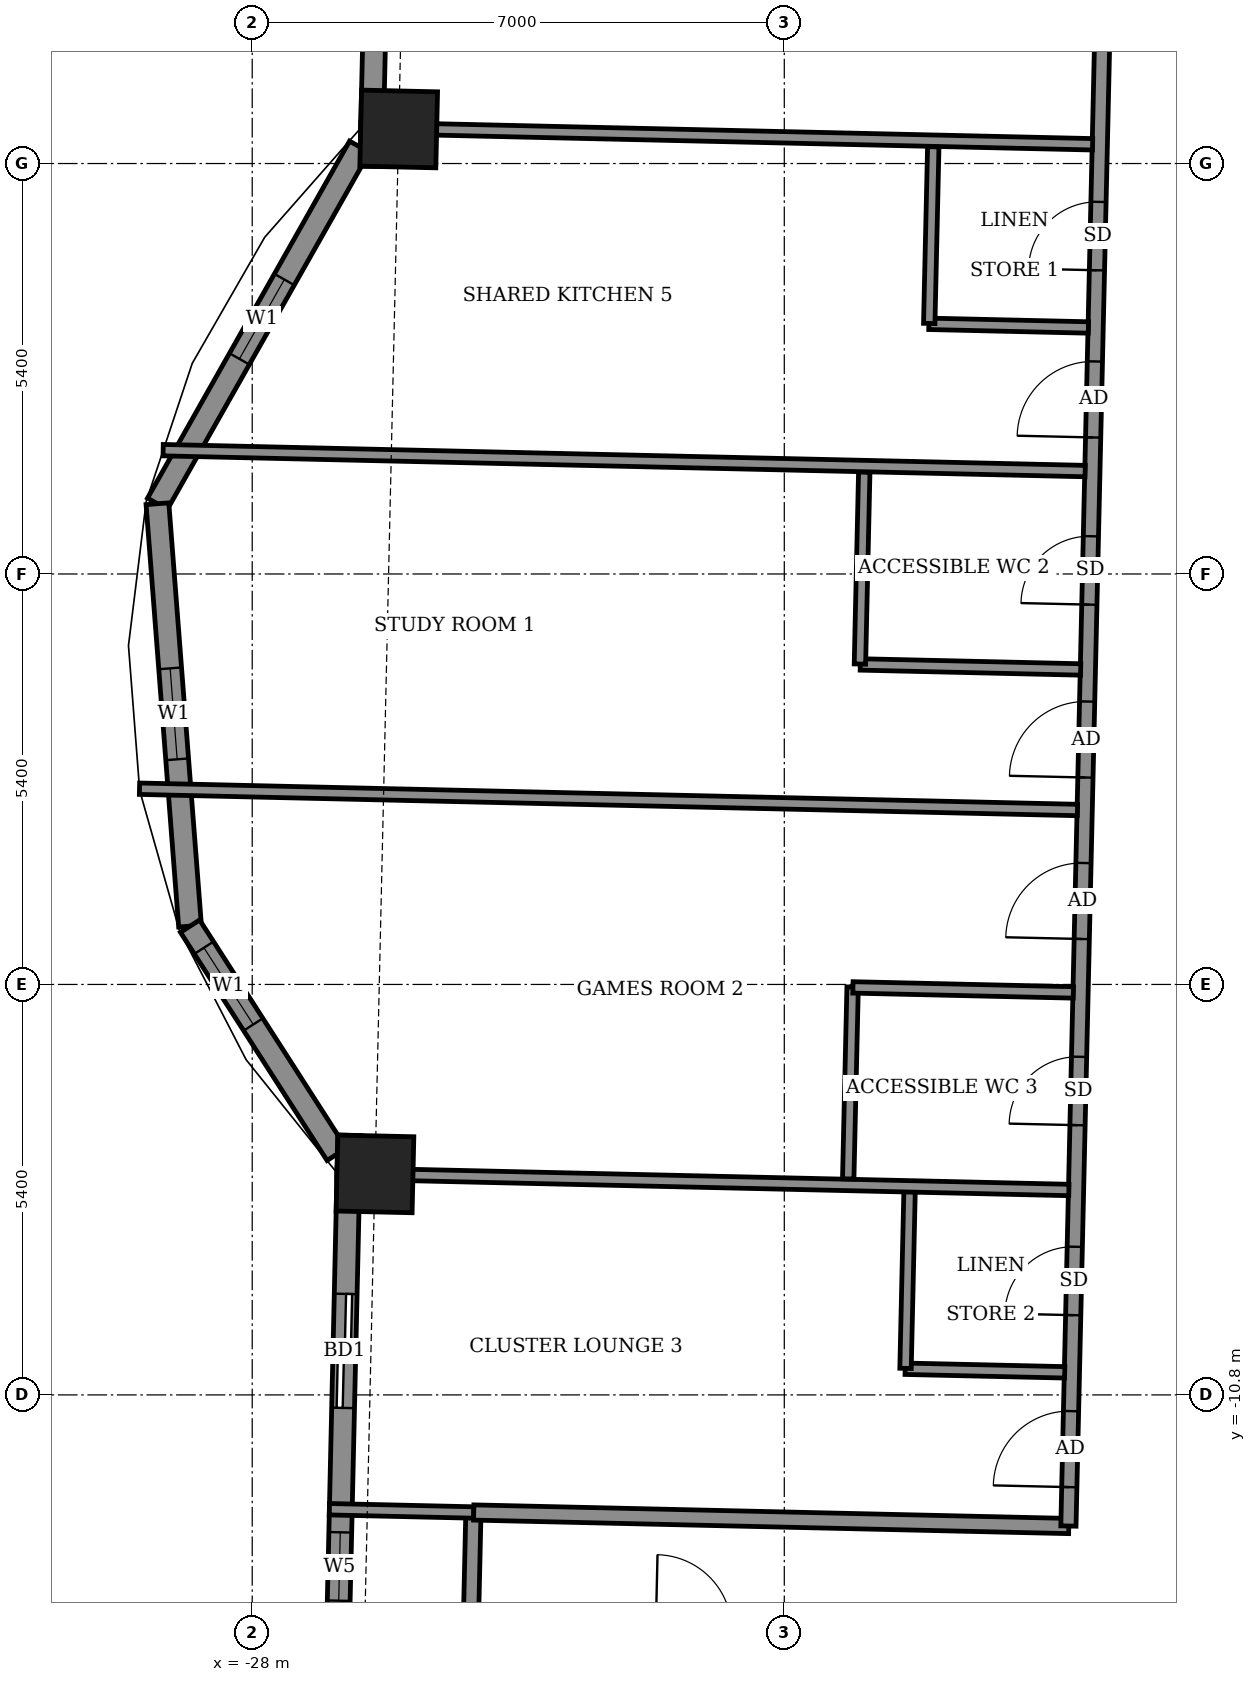
"""IFC4 building model, lengths in metres.
Left out: names, types, materials, properties, quantities, classifications, styles, units other than length and angle.
Written with IfcOpenShell. Run it as: python <this file> out.ifc"""

import sys

from ifc_helpers import new_model, si_unit, direction, frame, frame_2d, origin, origin_2d, place, context, subcontext, project, spatial, rectangle, extrude, element, fill, save


model = new_model("IFC4")
c1 = context("Model", 3, precision=1e-05, world=origin(), true_north=direction((0.0, 1.0)))
c2 = subcontext(c1, "Body", "Model", "MODEL_VIEW")
j1 = project(units=[si_unit("LENGTHUNIT", "METRE"), si_unit("PLANEANGLEUNIT", "RADIAN")], contexts=[c1])
p1 = place(None, origin())
s1 = spatial("IfcSite", under=j1, at=p1, CompositionType="ELEMENT")
p2 = place(p1, origin())
s2 = spatial("IfcBuilding", under=s1, at=p2, CompositionType="ELEMENT")
p3 = place(p2, frame((0.0, 0.0, 268.1)))
s3 = spatial("IfcBuildingStorey", under=s2, at=p3, CompositionType="ELEMENT", Elevation=268.1)
for number, where, z_axis, x_axis in (
    (1, (-26.385, -7.892, -0.55), (0.0, 0.0, 1.0), (-0.023, -1.0, 0.0)),
    (2, (-26.073, 5.855, -0.55), (0.0, 0.0, 1.0), (-0.023, -1.0, 0.0)),
):
    element("IfcColumn", number, at=place(p3, frame(where, z_axis=z_axis, x_axis=x_axis)), inside=s3, PredefinedType="COLUMN", context=c2, shape_type="SweptSolid", body=[
        extrude(rectangle(XDim=1.0, YDim=1.0, at=origin_2d()), origin(), (0.0, 0.0, 1.0), 3.6),
    ])
p4 = place(p3, frame((-26.113, 19.534, 0.0), z_axis=(0.0, 0.0, 1.0), x_axis=(-0.022649415303, -0.999743469089, 0.0)))
e3 = element("IfcWall", 3, at=p4, inside=s3, PredefinedType="SOLIDWALL", context=c2, shape_type="SweptSolid", body=[
    extrude(rectangle(XDim=14.175, YDim=0.3, at=frame_2d((7.087, 0.0))), origin(), (0.0, 0.0, 1.0), 2.55),
])
p5 = place(p4, frame((2.735, 0.0, 0.0)))
e4 = element("IfcOpeningElement", 4, at=p5, cuts=e3, PredefinedType="OPENING", context=c2, shape_type="SweptSolid", body=[
    extrude(rectangle(XDim=1.5, YDim=2.4, at=frame_2d((0.75, 1.2))), frame((0.0, 0.16, 0.0), z_axis=(0.0, -1.0, 0.0), x_axis=(1.0, 0.0, 0.0)), (0.0, 0.0, 1.0), 0.32),
])
p6 = place(p4, frame((9.019, 0.0, 0.9)))
e5 = element("IfcOpeningElement", 5, at=p6, cuts=e3, PredefinedType="OPENING", context=c2, shape_type="SweptSolid", body=[
    extrude(rectangle(XDim=2.4, YDim=1.5, at=frame_2d((1.2, 0.75))), frame((0.0, 0.16, 0.0), z_axis=(0.0, -1.0, 0.0), x_axis=(1.0, 0.0, 0.0)), (0.0, 0.0, 1.0), 0.32),
])
p7 = place(p3, frame((-26.589, 5.621, 0.0), z_axis=(0.0, 0.0, 1.0), x_axis=(-0.492495436053, -0.870315026566, 0.0)))
e6 = element("IfcWall", 6, at=p7, inside=s3, PredefinedType="SOLIDWALL", context=c2, shape_type="SweptSolid", body=[
    extrude(rectangle(XDim=5.397, YDim=0.3, at=frame_2d((2.698, 0.0))), origin(), (0.0, 0.0, 1.0), 3.05),
])
p8 = place(p7, frame((2.007, 0.0, 0.9)))
e7 = element("IfcOpeningElement", 7, at=p8, cuts=e6, PredefinedType="OPENING", context=c2, shape_type="SweptSolid", body=[
    extrude(rectangle(XDim=1.2, YDim=1.5, at=frame_2d((0.6, 0.75))), frame((0.0, 0.16, 0.0), z_axis=(0.0, -1.0, 0.0), x_axis=(1.0, 0.0, 0.0)), (0.0, 0.0, 1.0), 0.32),
])
p9 = place(p3, frame((-29.247, 0.924, 0.0), z_axis=(0.0, 0.0, 1.0), x_axis=(0.076961115238, -0.997034095075, 0.0)))
e8 = element("IfcWall", 8, at=p9, inside=s3, PredefinedType="SOLIDWALL", context=c2, shape_type="SweptSolid", body=[
    extrude(rectangle(XDim=5.574, YDim=0.3, at=frame_2d((2.787, 0.0))), origin(), (0.0, 0.0, 1.0), 3.05),
])
p10 = place(p9, frame((2.172, 0.0, 0.9)))
e9 = element("IfcOpeningElement", 9, at=p10, cuts=e8, PredefinedType="OPENING", context=c2, shape_type="SweptSolid", body=[
    extrude(rectangle(XDim=1.2, YDim=1.5, at=frame_2d((0.6, 0.75))), frame((0.0, 0.16, 0.0), z_axis=(0.0, -1.0, 0.0), x_axis=(1.0, 0.0, 0.0)), (0.0, 0.0, 1.0), 0.32),
])
p11 = place(p3, frame((-28.818, -4.633, 0.0), z_axis=(0.0, 0.0, 1.0), x_axis=(0.540633100578, -0.841258492117, 0.0)))
e10 = element("IfcWall", 10, at=p11, inside=s3, PredefinedType="SOLIDWALL", context=c2, shape_type="SweptSolid", body=[
    extrude(rectangle(XDim=3.568, YDim=0.3, at=frame_2d((1.784, 0.0))), origin(), (0.0, 0.0, 1.0), 3.05),
])
p12 = place(p11, frame((0.338, 0.0, 0.9)))
e11 = element("IfcOpeningElement", 11, at=p12, cuts=e10, PredefinedType="OPENING", context=c2, shape_type="SweptSolid", body=[
    extrude(rectangle(XDim=1.2, YDim=1.5, at=frame_2d((0.6, 0.75))), frame((0.0, 0.16, 0.0), z_axis=(0.0, -1.0, 0.0), x_axis=(1.0, 0.0, 0.0)), (0.0, 0.0, 1.0), 0.32),
])
p13 = place(p3, frame((-26.723, -7.385, 0.0), z_axis=(0.0, 0.0, 1.0), x_axis=(-0.022715697396, -0.999741965255, 0.0)))
e12 = element("IfcWall", 12, at=p13, inside=s3, PredefinedType="SOLIDWALL", context=c2, shape_type="SweptSolid", body=[
    extrude(rectangle(XDim=14.574, YDim=0.3, at=frame_2d((7.287, 0.0))), origin(), (0.0, 0.0, 1.0), 2.55),
])
p14 = place(p13, frame((2.087, 0.0, 0.0)))
e13 = element("IfcOpeningElement", 13, at=p14, cuts=e12, PredefinedType="OPENING", context=c2, shape_type="SweptSolid", body=[
    extrude(rectangle(XDim=1.5, YDim=2.4, at=frame_2d((0.75, 1.2))), frame((0.0, 0.16, 0.0), z_axis=(0.0, -1.0, 0.0), x_axis=(1.0, 0.0, 0.0)), (0.0, 0.0, 1.0), 0.32),
])
p15 = place(p13, frame((5.224, 0.0, 0.9)))
e14 = element("IfcOpeningElement", 14, at=p15, cuts=e12, PredefinedType="OPENING", context=c2, shape_type="SweptSolid", body=[
    extrude(rectangle(XDim=0.9, YDim=1.5, at=frame_2d((0.45, 0.75))), frame((0.0, 0.16, 0.0), z_axis=(0.0, -1.0, 0.0), x_axis=(1.0, 0.0, 0.0)), (0.0, 0.0, 1.0), 0.32),
])
p16 = place(p13, frame((9.749, 0.0, 0.9)))
e15 = element("IfcOpeningElement", 15, at=p16, cuts=e12, PredefinedType="OPENING", context=c2, shape_type="SweptSolid", body=[
    extrude(rectangle(XDim=2.4, YDim=1.5, at=frame_2d((1.2, 0.75))), frame((0.0, 0.16, 0.0), z_axis=(0.0, -1.0, 0.0), x_axis=(1.0, 0.0, 0.0)), (0.0, 0.0, 1.0), 0.32),
])
p17 = place(p3, frame((-29.57, -10.945, 0.0), z_axis=(0.0, 0.0, 1.0), x_axis=(0.022675106248, 0.999742886725, 0.0)))
e16 = element("IfcWall", 16, at=p17, inside=s3, PredefinedType="USERDEFINED", context=c2, shape_type="SweptSolid", body=[
    extrude(rectangle(XDim=2.875, YDim=0.55, at=frame_2d((1.438, 0.0))), origin(), (0.0, 0.0, 1.0), 0.8),
])
p18 = place(p3, frame((-25.124, -13.847, 0.0), z_axis=(0.0, 0.0, 1.0), x_axis=(0.022617910375, 0.999744182344, 0.0)))
e17 = element("IfcWall", 17, at=p18, inside=s3, PredefinedType="PARTITIONING", context=c2, shape_type="SweptSolid", body=[
    extrude(rectangle(XDim=1.5, YDim=0.2, at=frame_2d((0.75, 0.0))), origin(), (0.0, 0.0, 1.0), 3.05),
])
p19 = place(p3, frame((-26.985, -12.304, 0.0), z_axis=(0.0, 0.0, 1.0), x_axis=(0.999744152544, -0.022619227516, 0.0)))
e18 = element("IfcWall", 18, at=p19, inside=s3, PredefinedType="PARTITIONING", context=c2, shape_type="SweptSolid", body=[
    extrude(rectangle(XDim=1.9, YDim=0.15, at=frame_2d((0.95, 0.0))), origin(), (0.0, 0.0, 1.0), 2.5),
])
p20 = place(p3, frame((-25.086, -12.347, 0.0), z_axis=(0.0, 0.0, 1.0), x_axis=(0.999741690667, -0.022727779103, 0.0)))
e19 = element("IfcWall", 19, at=p20, inside=s3, PredefinedType="PARTITIONING", context=c2, shape_type="SweptSolid", body=[
    extrude(rectangle(XDim=7.831, YDim=0.2, at=frame_2d((3.916, 0.0))), origin(), (0.0, 0.0, 1.0), 3.05),
])
p21 = place(p3, frame((-17.262, -12.525, 0.0), z_axis=(0.0, 0.0, 1.0), x_axis=(0.022706151961, 0.999742182097, 0.0)))
e20 = element("IfcWall", 20, at=p21, inside=s3, PredefinedType="PARTITIONING", context=c2, shape_type="SweptSolid", body=[
    extrude(rectangle(XDim=25.45, YDim=0.2, at=frame_2d((12.725, 0.0))), origin(), (0.0, 0.0, 1.0), 3.05),
])
p22 = place(p21, frame((19.913, 0.0, 0.0)))
e21 = element("IfcOpeningElement", 21, at=p22, cuts=e20, PredefinedType="OPENING", context=c2, shape_type="SweptSolid", body=[
    extrude(rectangle(XDim=1.0, YDim=2.1, at=frame_2d((0.5, 1.05))), frame((0.0, 0.11, 0.0), z_axis=(0.0, -1.0, 0.0), x_axis=(1.0, 0.0, 0.0)), (0.0, 0.0, 1.0), 0.22),
])
p23 = place(p21, frame((23.6, 0.0, 0.0)))
e22 = element("IfcOpeningElement", 22, at=p23, cuts=e20, PredefinedType="OPENING", context=c2, shape_type="SweptSolid", body=[
    extrude(rectangle(XDim=0.9, YDim=2.1, at=frame_2d((0.45, 1.05))), frame((0.0, 0.11, 0.0), z_axis=(0.0, -1.0, 0.0), x_axis=(1.0, 0.0, 0.0)), (0.0, 0.0, 1.0), 0.22),
])
p24 = place(p21, frame((14.325, 0.0, 0.0)))
e23 = element("IfcOpeningElement", 23, at=p24, cuts=e20, PredefinedType="OPENING", context=c2, shape_type="SweptSolid", body=[
    extrude(rectangle(XDim=1.0, YDim=2.1, at=frame_2d((0.5, 1.05))), frame((0.0, 0.11, 0.0), z_axis=(0.0, -1.0, 0.0), x_axis=(1.0, 0.0, 0.0)), (0.0, 0.0, 1.0), 0.22),
])
p25 = place(p21, frame((16.525, 0.0, 0.0)))
e24 = element("IfcOpeningElement", 24, at=p25, cuts=e20, PredefinedType="OPENING", context=c2, shape_type="SweptSolid", body=[
    extrude(rectangle(XDim=0.9, YDim=2.1, at=frame_2d((0.45, 1.05))), frame((0.0, 0.11, 0.0), z_axis=(0.0, -1.0, 0.0), x_axis=(1.0, 0.0, 0.0)), (0.0, 0.0, 1.0), 0.22),
])
p26 = place(p21, frame((9.85, 0.0, 0.0)))
e25 = element("IfcOpeningElement", 25, at=p26, cuts=e20, PredefinedType="OPENING", context=c2, shape_type="SweptSolid", body=[
    extrude(rectangle(XDim=1.0, YDim=2.1, at=frame_2d((0.5, 1.05))), frame((0.0, 0.11, 0.0), z_axis=(0.0, -1.0, 0.0), x_axis=(1.0, 0.0, 0.0)), (0.0, 0.0, 1.0), 0.22),
])
p27 = place(p21, frame((12.125, 0.0, 0.0)))
e26 = element("IfcOpeningElement", 26, at=p27, cuts=e20, PredefinedType="OPENING", context=c2, shape_type="SweptSolid", body=[
    extrude(rectangle(XDim=0.9, YDim=2.1, at=frame_2d((0.45, 1.05))), frame((0.0, 0.11, 0.0), z_axis=(0.0, -1.0, 0.0), x_axis=(1.0, 0.0, 0.0)), (0.0, 0.0, 1.0), 0.22),
])
p28 = place(p21, frame((7.725, 0.0, 0.0)))
e27 = element("IfcOpeningElement", 27, at=p28, cuts=e20, PredefinedType="OPENING", context=c2, shape_type="SweptSolid", body=[
    extrude(rectangle(XDim=1.0, YDim=2.1, at=frame_2d((0.5, 1.05))), frame((0.0, 0.11, 0.0), z_axis=(0.0, -1.0, 0.0), x_axis=(1.0, 0.0, 0.0)), (0.0, 0.0, 1.0), 0.22),
])
p29 = place(p21, frame((5.275, 0.0, 0.0)))
e28 = element("IfcOpeningElement", 28, at=p29, cuts=e20, PredefinedType="OPENING", context=c2, shape_type="SweptSolid", body=[
    extrude(rectangle(XDim=0.9, YDim=2.1, at=frame_2d((0.45, 1.05))), frame((0.0, 0.11, 0.0), z_axis=(0.0, -1.0, 0.0), x_axis=(1.0, 0.0, 0.0)), (0.0, 0.0, 1.0), 0.22),
])
p30 = place(p21, frame((0.512, 0.0, 0.0)))
e29 = element("IfcOpeningElement", 29, at=p30, cuts=e20, PredefinedType="OPENING", context=c2, shape_type="SweptSolid", body=[
    extrude(rectangle(XDim=1.0, YDim=2.1, at=frame_2d((0.5, 1.05))), frame((0.0, 0.11, 0.0), z_axis=(0.0, -1.0, 0.0), x_axis=(1.0, 0.0, 0.0)), (0.0, 0.0, 1.0), 0.22),
])
p31 = place(p21, frame((2.775, 0.0, 0.0)))
e30 = element("IfcOpeningElement", 30, at=p31, cuts=e20, PredefinedType="OPENING", context=c2, shape_type="SweptSolid", body=[
    extrude(rectangle(XDim=0.9, YDim=2.1, at=frame_2d((0.45, 1.05))), frame((0.0, 0.11, 0.0), z_axis=(0.0, -1.0, 0.0), x_axis=(1.0, 0.0, 0.0)), (0.0, 0.0, 1.0), 0.22),
])
p32 = place(p3, frame((-19.41, -10.456, 0.0), z_axis=(0.0, 0.0, 1.0), x_axis=(0.999750703499, -0.022327804475, 0.0)))
e31 = element("IfcWall", 31, at=p32, inside=s3, PredefinedType="PARTITIONING", context=c2, shape_type="SweptSolid", body=[
    extrude(rectangle(XDim=2.099, YDim=0.15, at=frame_2d((1.05, 0.0))), origin(), (0.0, 0.0, 1.0), 3.05),
])
p33 = place(p3, frame((-19.405, -10.451, 0.0), z_axis=(0.0, 0.0, 1.0), x_axis=(0.022781023197, 0.999740478815, 0.0)))
e32 = element("IfcWall", 32, at=p33, inside=s3, PredefinedType="PARTITIONING", context=c2, shape_type="SweptSolid", body=[
    extrude(rectangle(XDim=2.325, YDim=0.15, at=frame_2d((1.163, 0.0))), origin(), (0.0, 0.0, 1.0), 3.05),
])
p34 = place(p3, frame((-26.885, -7.885, 0.0), z_axis=(0.0, 0.0, 1.0), x_axis=(0.999741468995, -0.022737527832, 0.0)))
e33 = element("IfcWall", 33, at=p34, inside=s3, PredefinedType="PARTITIONING", context=c2, shape_type="SweptSolid", body=[
    extrude(rectangle(XDim=9.631, YDim=0.15, at=frame_2d((4.816, 0.0))), origin(), (0.0, 0.0, 1.0), 3.05),
])
p35 = place(p3, frame((-20.159, -7.958, 0.0), z_axis=(0.0, 0.0, 1.0), x_axis=(0.022919108675, 0.999737322729, 0.0)))
e34 = element("IfcWall", 34, at=p35, inside=s3, PredefinedType="PARTITIONING", context=c2, shape_type="SweptSolid", body=[
    extrude(rectangle(XDim=2.525, YDim=0.15, at=frame_2d((1.262, 0.0))), origin(), (0.0, 0.0, 1.0), 3.05),
])
p36 = place(p3, frame((-20.097, -5.439, 0.0), z_axis=(0.0, 0.0, 1.0), x_axis=(0.999741748633, -0.022725229174, 0.0)))
e35 = element("IfcWall", 35, at=p36, inside=s3, PredefinedType="PARTITIONING", context=c2, shape_type="SweptSolid", body=[
    extrude(rectangle(XDim=2.901, YDim=0.15, at=frame_2d((1.45, 0.0))), origin(), (0.0, 0.0, 1.0), 3.05),
])
p37 = place(p3, frame((-29.483, -2.825, 0.0), z_axis=(0.0, 0.0, 1.0), x_axis=(0.999742611035, -0.022687258129, 0.0)))
e36 = element("IfcWall", 36, at=p37, inside=s3, PredefinedType="PARTITIONING", context=c2, shape_type="SweptSolid", body=[
    extrude(rectangle(XDim=12.343, YDim=0.15, at=frame_2d((6.171, 0.0))), origin(), (0.0, 0.0, 1.0), 2.1),
])
p38 = place(p3, frame((-20.0, -1.19, 0.0), z_axis=(0.0, 0.0, 1.0), x_axis=(0.999739657619, -0.022817032779, 0.0)))
e37 = element("IfcWall", 37, at=p38, inside=s3, PredefinedType="PARTITIONING", context=c2, shape_type="SweptSolid", body=[
    extrude(rectangle(XDim=2.9, YDim=0.15, at=frame_2d((1.45, 0.0))), origin(), (0.0, 0.0, 1.0), 3.05),
])
p39 = place(p3, frame((-20.005, -1.185, 0.0), z_axis=(0.0, 0.0, 1.0), x_axis=(0.022521599255, 0.999746356616, 0.0)))
e38 = element("IfcWall", 38, at=p39, inside=s3, PredefinedType="PARTITIONING", context=c2, shape_type="SweptSolid", body=[
    extrude(rectangle(XDim=2.526, YDim=0.15, at=frame_2d((1.263, 0.0))), origin(), (0.0, 0.0, 1.0), 3.05),
])
p40 = place(p3, frame((-29.172, 1.629, 0.0), z_axis=(0.0, 0.0, 1.0), x_axis=(0.999743298181, -0.02265695791, 0.0)))
e39 = element("IfcWall", 39, at=p40, inside=s3, PredefinedType="PARTITIONING", context=c2, shape_type="SweptSolid", body=[
    extrude(rectangle(XDim=12.133, YDim=0.15, at=frame_2d((6.067, 0.0))), origin(), (0.0, 0.0, 1.0), 2.1),
])
p41 = place(p3, frame((-19.098, 3.291, 0.0), z_axis=(0.0, 0.0, 1.0), x_axis=(0.999737555419, -0.022908956429, 0.0)))
e40 = element("IfcWall", 40, at=p41, inside=s3, PredefinedType="PARTITIONING", context=c2, shape_type="SweptSolid", body=[
    extrude(rectangle(XDim=2.099, YDim=0.15, at=frame_2d((1.05, 0.0))), origin(), (0.0, 0.0, 1.0), 3.05),
])
p42 = place(p3, frame((-19.093, 3.296, 0.0), z_axis=(0.0, 0.0, 1.0), x_axis=(0.022788198363, 0.99974031529, 0.0)))
e41 = element("IfcWall", 41, at=p42, inside=s3, PredefinedType="PARTITIONING", context=c2, shape_type="SweptSolid", body=[
    extrude(rectangle(XDim=2.325, YDim=0.15, at=frame_2d((1.162, 0.0))), origin(), (0.0, 0.0, 1.0), 3.05),
])
p43 = place(p3, frame((-26.573, 5.871, 0.0), z_axis=(0.0, 0.0, 1.0), x_axis=(0.999743768709, -0.022636186244, 0.0)))
e42 = element("IfcWall", 42, at=p43, inside=s3, PredefinedType="PARTITIONING", context=c2, shape_type="SweptSolid", body=[
    extrude(rectangle(XDim=9.631, YDim=0.15, at=frame_2d((4.816, 0.0))), origin(), (0.0, 0.0, 1.0), 3.05),
])
p44 = place(p8, origin())
e43 = element("IfcWindow", 43, at=p44, inside=s3, PartitioningType="SINGLE_PANEL", PredefinedType="WINDOW", context=c2, shape_type="SweptSolid", body=[
    extrude(rectangle(XDim=1.2, YDim=1.5, at=frame_2d((0.6, 0.75))), frame((0.0, 0.03, 0.0), z_axis=(0.0, -1.0, 0.0), x_axis=(1.0, 0.0, 0.0)), (0.0, 0.0, 1.0), 0.06),
])
fill(e7, e43)
p45 = place(p10, origin())
e44 = element("IfcWindow", 44, at=p45, inside=s3, PartitioningType="SINGLE_PANEL", PredefinedType="WINDOW", context=c2, shape_type="SweptSolid", body=[
    extrude(rectangle(XDim=1.2, YDim=1.5, at=frame_2d((0.6, 0.75))), frame((0.0, 0.03, 0.0), z_axis=(0.0, -1.0, 0.0), x_axis=(1.0, 0.0, 0.0)), (0.0, 0.0, 1.0), 0.06),
])
fill(e9, e44)
p46 = place(p12, origin())
e45 = element("IfcWindow", 45, at=p46, inside=s3, PartitioningType="SINGLE_PANEL", PredefinedType="WINDOW", context=c2, shape_type="SweptSolid", body=[
    extrude(rectangle(XDim=1.2, YDim=1.5, at=frame_2d((0.6, 0.75))), frame((0.0, 0.03, 0.0), z_axis=(0.0, -1.0, 0.0), x_axis=(1.0, 0.0, 0.0)), (0.0, 0.0, 1.0), 0.06),
])
fill(e11, e45)
p47 = place(p14, origin())
e46 = element("IfcDoor", 46, at=p47, inside=s3, OperationType="SLIDING_TO_LEFT", PredefinedType="DOOR", context=c2, shape_type="SweptSolid", body=[
    extrude(rectangle(XDim=1.5, YDim=2.4, at=frame_2d((0.75, 1.2))), frame((0.0, 0.025, 0.0), z_axis=(0.0, -1.0, 0.0), x_axis=(1.0, 0.0, 0.0)), (0.0, 0.0, 1.0), 0.05),
])
fill(e13, e46)
p48 = place(p15, origin())
e47 = element("IfcWindow", 47, at=p48, inside=s3, PartitioningType="SINGLE_PANEL", PredefinedType="WINDOW", context=c2, shape_type="SweptSolid", body=[
    extrude(rectangle(XDim=0.9, YDim=1.5, at=frame_2d((0.45, 0.75))), frame((0.0, 0.03, 0.0), z_axis=(0.0, -1.0, 0.0), x_axis=(1.0, 0.0, 0.0)), (0.0, 0.0, 1.0), 0.06),
])
fill(e14, e47)
p49 = place(p24, origin())
e48 = element("IfcDoor", 48, at=p49, inside=s3, OperationType="SINGLE_SWING_RIGHT", PredefinedType="DOOR", context=c2, shape_type="SweptSolid", body=[
    extrude(rectangle(XDim=1.0, YDim=2.1, at=frame_2d((0.5, 1.05))), frame((0.0, 0.025, 0.0), z_axis=(0.0, -1.0, 0.0), x_axis=(1.0, 0.0, 0.0)), (0.0, 0.0, 1.0), 0.05),
])
fill(e23, e48)
p50 = place(p25, origin())
e49 = element("IfcDoor", 49, at=p50, inside=s3, OperationType="SINGLE_SWING_RIGHT", PredefinedType="DOOR", context=c2, shape_type="SweptSolid", body=[
    extrude(rectangle(XDim=0.9, YDim=2.1, at=frame_2d((0.45, 1.05))), frame((0.0, 0.025, 0.0), z_axis=(0.0, -1.0, 0.0), x_axis=(1.0, 0.0, 0.0)), (0.0, 0.0, 1.0), 0.05),
])
fill(e24, e49)
p51 = place(p26, origin())
e50 = element("IfcDoor", 50, at=p51, inside=s3, OperationType="SINGLE_SWING_LEFT", PredefinedType="DOOR", context=c2, shape_type="SweptSolid", body=[
    extrude(rectangle(XDim=1.0, YDim=2.1, at=frame_2d((0.5, 1.05))), frame((0.0, 0.025, 0.0), z_axis=(0.0, -1.0, 0.0), x_axis=(1.0, 0.0, 0.0)), (0.0, 0.0, 1.0), 0.05),
])
fill(e25, e50)
p52 = place(p27, origin())
e51 = element("IfcDoor", 51, at=p52, inside=s3, OperationType="SINGLE_SWING_LEFT", PredefinedType="DOOR", context=c2, shape_type="SweptSolid", body=[
    extrude(rectangle(XDim=0.9, YDim=2.1, at=frame_2d((0.45, 1.05))), frame((0.0, 0.025, 0.0), z_axis=(0.0, -1.0, 0.0), x_axis=(1.0, 0.0, 0.0)), (0.0, 0.0, 1.0), 0.05),
])
fill(e26, e51)
p53 = place(p28, origin())
e52 = element("IfcDoor", 52, at=p53, inside=s3, OperationType="SINGLE_SWING_RIGHT", PredefinedType="DOOR", context=c2, shape_type="SweptSolid", body=[
    extrude(rectangle(XDim=1.0, YDim=2.1, at=frame_2d((0.5, 1.05))), frame((0.0, 0.025, 0.0), z_axis=(0.0, -1.0, 0.0), x_axis=(1.0, 0.0, 0.0)), (0.0, 0.0, 1.0), 0.05),
])
fill(e27, e52)
p54 = place(p29, origin())
e53 = element("IfcDoor", 53, at=p54, inside=s3, OperationType="SINGLE_SWING_RIGHT", PredefinedType="DOOR", context=c2, shape_type="SweptSolid", body=[
    extrude(rectangle(XDim=0.9, YDim=2.1, at=frame_2d((0.45, 1.05))), frame((0.0, 0.025, 0.0), z_axis=(0.0, -1.0, 0.0), x_axis=(1.0, 0.0, 0.0)), (0.0, 0.0, 1.0), 0.05),
])
fill(e28, e53)
p55 = place(p30, origin())
e54 = element("IfcDoor", 54, at=p55, inside=s3, OperationType="SINGLE_SWING_LEFT", PredefinedType="DOOR", context=c2, shape_type="SweptSolid", body=[
    extrude(rectangle(XDim=1.0, YDim=2.1, at=frame_2d((0.5, 1.05))), frame((0.0, 0.025, 0.0), z_axis=(0.0, -1.0, 0.0), x_axis=(1.0, 0.0, 0.0)), (0.0, 0.0, 1.0), 0.05),
])
fill(e29, e54)
p56 = place(p31, origin())
e55 = element("IfcDoor", 55, at=p56, inside=s3, OperationType="SINGLE_SWING_LEFT", PredefinedType="DOOR", context=c2, shape_type="SweptSolid", body=[
    extrude(rectangle(XDim=0.9, YDim=2.1, at=frame_2d((0.45, 1.05))), frame((0.0, 0.025, 0.0), z_axis=(0.0, -1.0, 0.0), x_axis=(1.0, 0.0, 0.0)), (0.0, 0.0, 1.0), 0.05),
])
fill(e30, e55)
save(model, sys.argv[1])
